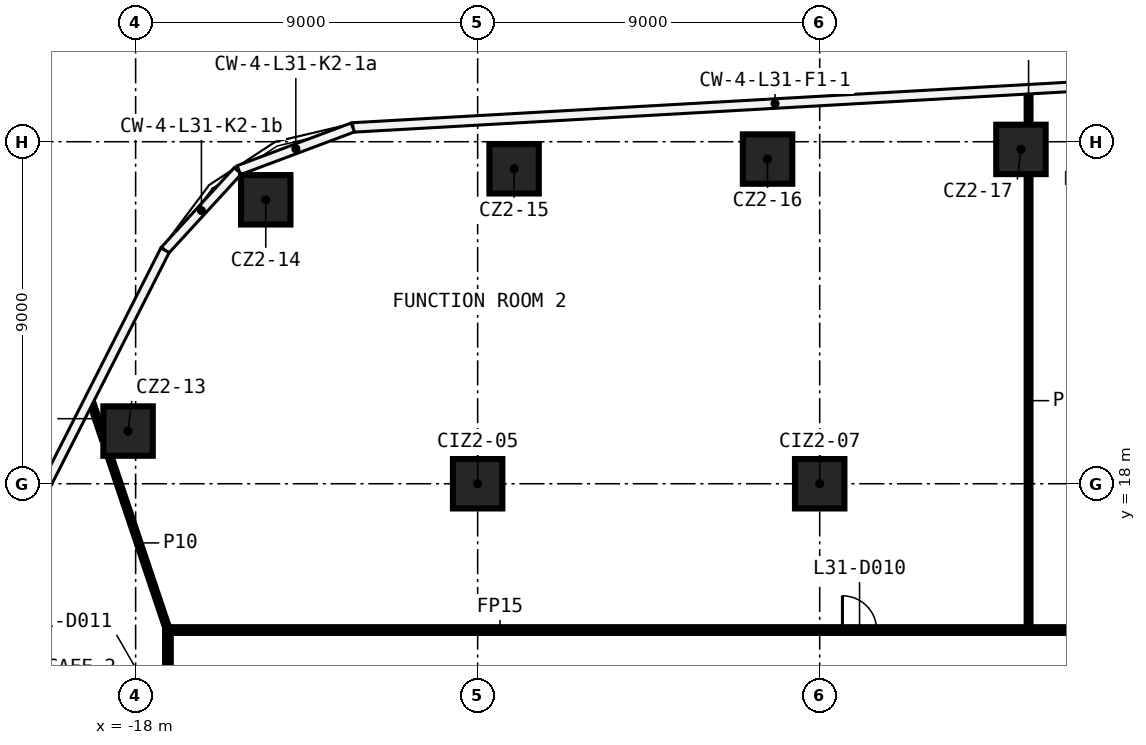
"""IFC4 building model, lengths in metres.
Left out: names, types, materials, properties, quantities, classifications, styles, units other than length and angle.
Written with IfcOpenShell. Run it as: python <this file> out.ifc"""

import sys

from ifc_helpers import new_model, si_unit, direction, frame, frame_2d, origin, origin_2d, place, context, subcontext, project, spatial, rectangle, extrude, element, fill, save


model = new_model("IFC4")
c1 = context("Model", 3, precision=1e-05, world=origin(), true_north=direction((0.0, 1.0)))
c2 = subcontext(c1, "Body", "Model", "MODEL_VIEW")
j1 = project(units=[si_unit("LENGTHUNIT", "METRE"), si_unit("PLANEANGLEUNIT", "RADIAN")], contexts=[c1])
p1 = place(None, origin())
s1 = spatial("IfcSite", under=j1, at=p1, CompositionType="ELEMENT")
p2 = place(p1, origin())
s2 = spatial("IfcBuilding", under=s1, at=p2, CompositionType="ELEMENT")
p3 = place(p2, frame((0.0, 0.0, 139.6)))
s3 = spatial("IfcBuildingStorey", under=s2, at=p3, CompositionType="ELEMENT", Elevation=139.6)
for number, where, z_axis, x_axis in (
    (1, (-18.199, 19.386, 0.0), (0.0, 0.0, 1.0), (1.0, 0.0, 0.0)),
    (2, (-14.576, 25.472, 0.0), (0.0, 0.0, 1.0), (1.0, 0.0, 0.0)),
    (3, (-8.041, 26.288, 0.0), (0.0, 0.0, 1.0), (1.0, 0.0, 0.0)),
    (4, (-1.372, 26.544, 0.0), (0.0, 0.0, 1.0), (1.0, 0.0, 0.0)),
    (5, (5.295, 26.798, 0.0), (0.0, 0.0, 1.0), (1.0, 0.0, 0.0)),
    (6, (-9.0, 18.0, 0.0), (0.0, 0.0, 1.0), (1.0, 0.0, 0.0)),
    (7, (0.0, 18.0, 0.0), (0.0, 0.0, 1.0), (1.0, 0.0, 0.0)),
):
    element("IfcColumn", number, at=place(p3, frame(where, z_axis=z_axis, x_axis=x_axis)), inside=s3, PredefinedType="COLUMN", context=c2, shape_type="SweptSolid", body=[
        extrude(rectangle(XDim=1.3, YDim=1.3, at=origin_2d()), origin(), (0.0, 0.0, 1.0), 5.4),
    ])
p4 = place(p3, frame((-17.225, 14.15, 0.0), z_axis=(0.0, 0.0, 1.0), x_axis=(1.0, 0.0, 0.0)))
e8 = element("IfcWall", 8, at=p4, inside=s3, PredefinedType="PARTITIONING", context=c2, shape_type="SweptSolid", body=[
    extrude(rectangle(XDim=34.45, YDim=0.15, at=frame_2d((17.225, 0.0))), origin(), (0.0, 0.0, 1.0), 5.4),
])
p5 = place(p4, frame((31.208, 0.0, 0.0)))
e9 = element("IfcOpeningElement", 9, at=p5, cuts=e8, PredefinedType="OPENING", context=c2, shape_type="SweptSolid", body=[
    extrude(rectangle(XDim=0.9, YDim=2.1, at=frame_2d((0.45, 1.05))), frame((0.0, 0.085, 0.0), z_axis=(0.0, -1.0, 0.0), x_axis=(1.0, 0.0, 0.0)), (0.0, 0.0, 1.0), 0.17),
])
p6 = place(p4, frame((25.381, 0.0, 0.0)))
e10 = element("IfcOpeningElement", 10, at=p6, cuts=e8, PredefinedType="OPENING", context=c2, shape_type="SweptSolid", body=[
    extrude(rectangle(XDim=0.9, YDim=2.1, at=frame_2d((0.45, 1.05))), frame((0.0, 0.085, 0.0), z_axis=(0.0, -1.0, 0.0), x_axis=(1.0, 0.0, 0.0)), (0.0, 0.0, 1.0), 0.17),
])
p7 = place(p4, frame((17.823, 0.0, 0.0)))
e11 = element("IfcOpeningElement", 11, at=p7, cuts=e8, PredefinedType="OPENING", context=c2, shape_type="SweptSolid", body=[
    extrude(rectangle(XDim=0.9, YDim=2.1, at=frame_2d((0.45, 1.05))), frame((0.0, 0.085, 0.0), z_axis=(0.0, -1.0, 0.0), x_axis=(1.0, 0.0, 0.0)), (0.0, 0.0, 1.0), 0.17),
])
p8 = place(p3, frame((5.496, 14.225, 0.0), z_axis=(0.0, 0.0, 1.0), x_axis=(0.0, 1.0, 0.0)))
e12 = element("IfcWall", 12, at=p8, inside=s3, PredefinedType="PARTITIONING", context=c2, shape_type="SweptSolid", body=[
    extrude(rectangle(XDim=11.923, YDim=0.1, at=frame_2d((5.961, 0.0))), origin(), (0.0, 0.0, 1.0), 5.4),
])
p9 = place(p3, frame((5.496, 27.448, 0.0), z_axis=(0.0, 0.0, 1.0), x_axis=(0.0, 1.0, 0.0)))
e13 = element("IfcWall", 13, at=p9, inside=s3, PredefinedType="PARTITIONING", context=c2, shape_type="SweptSolid", body=[
    extrude(rectangle(XDim=0.914, YDim=0.1, at=frame_2d((0.457, 0.0))), origin(), (0.0, 0.0, 1.0), 5.4),
])
p10 = place(p3, frame((-17.15, -14.075, 0.0), z_axis=(0.0, 0.0, 1.0), x_axis=(0.0, 1.0, 0.0)))
e14 = element("IfcWall", 14, at=p10, inside=s3, PredefinedType="PARTITIONING", context=c2, shape_type="SweptSolid", body=[
    extrude(rectangle(XDim=28.15, YDim=0.15, at=frame_2d((14.075, 0.0))), origin(), (0.0, 0.0, 1.0), 5.4),
])
p11 = place(p10, frame((2.125, 0.0, 0.0)))
e15 = element("IfcOpeningElement", 15, at=p11, cuts=e14, PredefinedType="OPENING", context=c2, shape_type="SweptSolid", body=[
    extrude(rectangle(XDim=0.9, YDim=2.1, at=frame_2d((0.45, 1.05))), frame((0.0, 0.085, 0.0), z_axis=(0.0, -1.0, 0.0), x_axis=(1.0, 0.0, 0.0)), (0.0, 0.0, 1.0), 0.17),
])
p12 = place(p10, frame((25.303, 0.0, 0.0)))
e16 = element("IfcOpeningElement", 16, at=p12, cuts=e14, PredefinedType="OPENING", context=c2, shape_type="SweptSolid", body=[
    extrude(rectangle(XDim=0.9, YDim=2.1, at=frame_2d((0.45, 1.05))), frame((0.0, 0.085, 0.0), z_axis=(0.0, -1.0, 0.0), x_axis=(1.0, 0.0, 0.0)), (0.0, 0.0, 1.0), 0.17),
])
p13 = place(p10, frame((18.259, 0.0, 0.0)))
e17 = element("IfcOpeningElement", 17, at=p13, cuts=e14, PredefinedType="OPENING", context=c2, shape_type="SweptSolid", body=[
    extrude(rectangle(XDim=0.9, YDim=2.1, at=frame_2d((0.45, 1.05))), frame((0.0, 0.085, 0.0), z_axis=(0.0, -1.0, 0.0), x_axis=(1.0, 0.0, 0.0)), (0.0, 0.0, 1.0), 0.17),
])
p14 = place(p3, frame((-19.192, 20.222, 0.0), z_axis=(0.0, 0.0, 1.0), x_axis=(0.318678080151, -0.947863007629, 0.0)))
e18 = element("IfcWall", 18, at=p14, inside=s3, PredefinedType="PARTITIONING", context=c2, shape_type="SweptSolid", body=[
    extrude(rectangle(XDim=1.076, YDim=0.1, at=frame_2d((0.538, 0.0))), origin(), (0.0, 0.0, 1.0), 5.4),
])
p15 = place(p3, frame((-18.692, 18.736, 0.0), z_axis=(0.0, 0.0, 1.0), x_axis=(0.318754680196, -0.94783725072, 0.0)))
e19 = element("IfcWall", 19, at=p15, inside=s3, PredefinedType="PARTITIONING", context=c2, shape_type="SweptSolid", body=[
    extrude(rectangle(XDim=4.838, YDim=0.1, at=frame_2d((2.419, 0.0))), origin(), (0.0, 0.0, 1.0), 5.4),
])
p16 = place(p7, origin())
e20 = element("IfcDoor", 20, at=p16, inside=s3, OperationType="SINGLE_SWING_LEFT", PredefinedType="DOOR", context=c2, shape_type="SweptSolid", body=[
    extrude(rectangle(XDim=0.9, YDim=2.1, at=frame_2d((0.45, 1.05))), frame((0.0, 0.025, 0.0), z_axis=(0.0, -1.0, 0.0), x_axis=(1.0, 0.0, 0.0)), (0.0, 0.0, 1.0), 0.05),
])
fill(e11, e20)
save(model, sys.argv[1])
